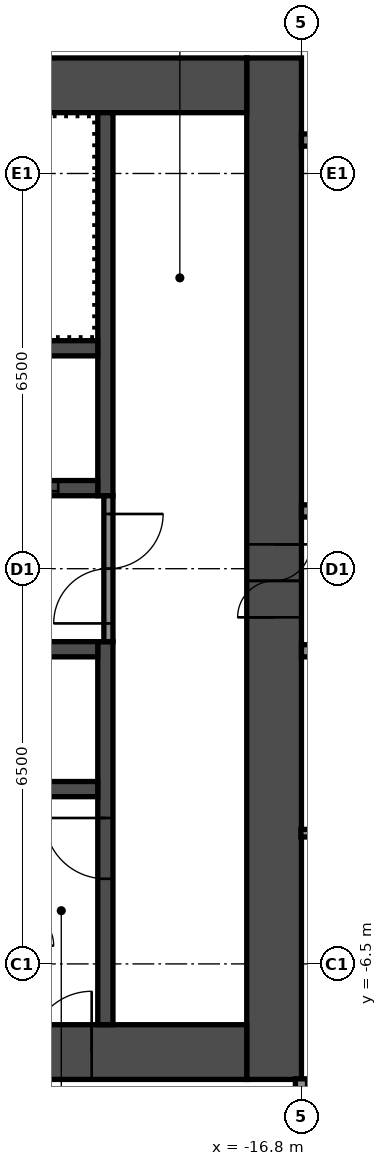
"""IFC4 building model, lengths in metres.
Left out: names, types, materials, properties, quantities, classifications, styles, units other than length and angle.
Written with IfcOpenShell. Run it as: python <this file> out.ifc"""

import sys

from ifc_helpers import new_model, si_unit, direction, frame, frame_2d, origin, place, context, subcontext, project, spatial, rectangle, extrude, element, fill, save


model = new_model("IFC4")
c1 = context("Model", 3, precision=1e-05, world=origin(), true_north=direction((0.0, 1.0)))
c2 = subcontext(c1, "Body", "Model", "MODEL_VIEW")
j1 = project(units=[si_unit("LENGTHUNIT", "METRE"), si_unit("PLANEANGLEUNIT", "RADIAN")], contexts=[c1])
p1 = place(None, origin())
s1 = spatial("IfcSite", under=j1, at=p1, CompositionType="ELEMENT")
p2 = place(p1, origin())
s2 = spatial("IfcBuilding", under=s1, at=p2, CompositionType="ELEMENT")
p3 = place(p2, frame((0.0, 0.0, 94.6)))
s3 = spatial("IfcBuildingStorey", under=s2, at=p3, CompositionType="ELEMENT", Elevation=94.6)
p4 = place(p3, frame((-17.25, -8.4, 0.0), z_axis=(0.0, 0.0, 1.0), x_axis=(0.0, 1.0, 0.0)))
e1 = element("IfcWall", 1, at=p4, inside=s3, PredefinedType="SHEAR", context=c2, shape_type="SweptSolid", body=[
    extrude(rectangle(XDim=16.8, YDim=0.9, at=frame_2d((8.4, 0.0))), origin(), (0.0, 0.0, 1.0), 2.8),
])
p5 = place(p4, frame((7.6, 0.0, 0.0)))
e2 = element("IfcOpeningElement", 2, at=p5, cuts=e1, PredefinedType="OPENING", context=c2, shape_type="SweptSolid", body=[
    extrude(rectangle(XDim=1.2, YDim=2.1, at=frame_2d((0.6, 1.05))), frame((0.0, 0.46, 0.0), z_axis=(0.0, -1.0, 0.0), x_axis=(1.0, 0.0, 0.0)), (0.0, 0.0, 1.0), 0.92),
])
p6 = place(p3, frame((-32.7, 7.95, 0.0), z_axis=(0.0, 0.0, 1.0), x_axis=(1.0, 0.0, 0.0)))
e3 = element("IfcWall", 3, at=p6, inside=s3, PredefinedType="SHEAR", context=c2, shape_type="SweptSolid", body=[
    extrude(rectangle(XDim=15.0, YDim=0.9, at=frame_2d((7.5, 0.0))), origin(), (0.0, 0.0, 1.0), 2.8),
])
p7 = place(p6, frame((3.4, 0.0, 0.0)))
e4 = element("IfcOpeningElement", 4, at=p7, cuts=e3, PredefinedType="OPENING", context=c2, shape_type="SweptSolid", body=[
    extrude(rectangle(XDim=1.2, YDim=2.1, at=frame_2d((0.6, 1.05))), frame((0.0, 0.46, 0.0), z_axis=(0.0, -1.0, 0.0), x_axis=(1.0, 0.0, 0.0)), (0.0, 0.0, 1.0), 0.92),
])
p8 = place(p6, frame((0.75, 0.0, 0.0)))
e5 = element("IfcOpeningElement", 5, at=p8, cuts=e3, PredefinedType="OPENING", context=c2, shape_type="SweptSolid", body=[
    extrude(rectangle(XDim=0.9, YDim=2.1, at=frame_2d((0.45, 1.05))), frame((0.0, 0.46, 0.0), z_axis=(0.0, -1.0, 0.0), x_axis=(1.0, 0.0, 0.0)), (0.0, 0.0, 1.0), 0.92),
])
p9 = place(p3, frame((-32.7, -7.95, 0.0), z_axis=(0.0, 0.0, 1.0), x_axis=(1.0, 0.0, 0.0)))
e6 = element("IfcWall", 6, at=p9, inside=s3, PredefinedType="SHEAR", context=c2, shape_type="SweptSolid", body=[
    extrude(rectangle(XDim=15.0, YDim=0.9, at=frame_2d((7.5, 0.0))), origin(), (0.0, 0.0, 1.0), 2.8),
])
p10 = place(p9, frame((11.45, 0.0, 0.0)))
e7 = element("IfcOpeningElement", 7, at=p10, cuts=e6, PredefinedType="OPENING", context=c2, shape_type="SweptSolid", body=[
    extrude(rectangle(XDim=1.0, YDim=2.1, at=frame_2d((0.5, 1.05))), frame((0.0, 0.46, 0.0), z_axis=(0.0, -1.0, 0.0), x_axis=(1.0, 0.0, 0.0)), (0.0, 0.0, 1.0), 0.92),
])
p11 = place(p3, frame((-20.025, 1.2, 0.0), z_axis=(0.0, 0.0, 1.0), x_axis=(0.0, 1.0, 0.0)))
e8 = element("IfcWall", 8, at=p11, inside=s3, PredefinedType="SHEAR", context=c2, shape_type="SweptSolid", body=[
    extrude(rectangle(XDim=6.3, YDim=0.25, at=frame_2d((3.15, 0.0))), origin(), (0.0, 0.0, 1.0), 2.8),
])
p12 = place(p3, frame((-20.025, -7.5, 0.0), z_axis=(0.0, 0.0, 1.0), x_axis=(0.0, 1.0, 0.0)))
e9 = element("IfcWall", 9, at=p12, inside=s3, PredefinedType="SHEAR", context=c2, shape_type="SweptSolid", body=[
    extrude(rectangle(XDim=6.3, YDim=0.25, at=frame_2d((3.15, 0.0))), origin(), (0.0, 0.0, 1.0), 2.8),
])
p13 = place(p12, frame((2.4, 0.0, 0.0)))
e10 = element("IfcOpeningElement", 10, at=p13, cuts=e9, PredefinedType="OPENING", context=c2, shape_type="SweptSolid", body=[
    extrude(rectangle(XDim=1.0, YDim=2.1, at=frame_2d((0.5, 1.05))), frame((0.0, 0.135, 0.0), z_axis=(0.0, -1.0, 0.0), x_axis=(1.0, 0.0, 0.0)), (0.0, 0.0, 1.0), 0.27),
])
p14 = place(p3, frame((-27.65, 1.325, 0.0), z_axis=(0.0, 0.0, 1.0), x_axis=(1.0, 0.0, 0.0)))
e11 = element("IfcWall", 11, at=p14, inside=s3, PredefinedType="SHEAR", context=c2, shape_type="SweptSolid", body=[
    extrude(rectangle(XDim=7.5, YDim=0.25, at=frame_2d((3.75, 0.0))), origin(), (0.0, 0.0, 1.0), 2.8),
])
p15 = place(p14, frame((5.75, 0.0, 0.0)))
e12 = element("IfcOpeningElement", 12, at=p15, cuts=e11, PredefinedType="OPENING", context=c2, shape_type="SweptSolid", body=[
    extrude(rectangle(XDim=1.1, YDim=2.1, at=frame_2d((0.55, 1.05))), frame((0.0, 0.135, 0.0), z_axis=(0.0, -1.0, 0.0), x_axis=(1.0, 0.0, 0.0)), (0.0, 0.0, 1.0), 0.27),
])
p16 = place(p14, frame((3.35, 0.0, 0.0)))
e13 = element("IfcOpeningElement", 13, at=p16, cuts=e11, PredefinedType="OPENING", context=c2, shape_type="SweptSolid", body=[
    extrude(rectangle(XDim=1.1, YDim=2.1, at=frame_2d((0.55, 1.05))), frame((0.0, 0.135, 0.0), z_axis=(0.0, -1.0, 0.0), x_axis=(1.0, 0.0, 0.0)), (0.0, 0.0, 1.0), 0.27),
])
p17 = place(p14, frame((0.95, 0.0, 0.0)))
e14 = element("IfcOpeningElement", 14, at=p17, cuts=e11, PredefinedType="OPENING", context=c2, shape_type="SweptSolid", body=[
    extrude(rectangle(XDim=1.1, YDim=2.1, at=frame_2d((0.55, 1.05))), frame((0.0, 0.135, 0.0), z_axis=(0.0, -1.0, 0.0), x_axis=(1.0, 0.0, 0.0)), (0.0, 0.0, 1.0), 0.27),
])
for number, where, z_axis, x_axis in (
    (15, (-27.65, 3.625, 0.0), (0.0, 0.0, 1.0), (1.0, 0.0, 0.0)),
    (16, (-27.65, -1.325, 0.0), (0.0, 0.0, 1.0), (1.0, 0.0, 0.0)),
    (17, (-27.65, -3.625, 0.0), (0.0, 0.0, 1.0), (1.0, 0.0, 0.0)),
):
    element("IfcWall", number, at=place(p3, frame(where, z_axis=z_axis, x_axis=x_axis)), inside=s3, PredefinedType="SHEAR", context=c2, shape_type="SweptSolid", body=[
        extrude(rectangle(XDim=7.5, YDim=0.25, at=frame_2d((3.75, 0.0))), origin(), (0.0, 0.0, 1.0), 2.8),
    ])
p18 = place(p3, frame((-19.975, -1.2, 0.0), z_axis=(0.0, 0.0, 1.0), x_axis=(0.0, 1.0, 0.0)))
e18 = element("IfcWall", 18, at=p18, inside=s3, PredefinedType="PARTITIONING", context=c2, shape_type="SweptSolid", body=[
    extrude(rectangle(XDim=2.4, YDim=0.15, at=frame_2d((1.2, 0.0))), origin(), (0.0, 0.0, 1.0), 2.8),
])
p19 = place(p18, frame((0.3, 0.0, 0.0)))
e19 = element("IfcOpeningElement", 19, at=p19, cuts=e18, PredefinedType="OPENING", context=c2, shape_type="SweptSolid", body=[
    extrude(rectangle(XDim=1.8, YDim=2.1, at=frame_2d((0.9, 1.05))), frame((0.0, 0.085, 0.0), z_axis=(0.0, -1.0, 0.0), x_axis=(1.0, 0.0, 0.0)), (0.0, 0.0, 1.0), 0.17),
])
p20 = place(p3, frame((-16.81, -4.35, 0.0), z_axis=(0.0, 0.0, 1.0), x_axis=(1.0, 0.0, 0.0)))
e20 = element("IfcWall", 20, at=p20, inside=s3, PredefinedType="PARTITIONING", context=c2, shape_type="SweptSolid", body=[
    extrude(rectangle(XDim=2.448, YDim=0.125, at=frame_2d((1.224, 0.0))), origin(), (0.0, 0.0, 1.0), 2.8),
])
p21 = place(p3, frame((-16.8, -1.35, 0.0), z_axis=(0.0, 0.0, 1.0), x_axis=(1.0, 0.0, 0.0)))
e21 = element("IfcWall", 21, at=p21, inside=s3, PredefinedType="PARTITIONING", context=c2, shape_type="SweptSolid", body=[
    extrude(rectangle(XDim=33.6, YDim=0.2, at=frame_2d((16.8, 0.0))), origin(), (0.0, 0.0, 1.0), 2.8),
])
p22 = place(p21, frame((2.85, 0.0, 0.0)))
e22 = element("IfcOpeningElement", 22, at=p22, cuts=e21, PredefinedType="OPENING", context=c2, shape_type="SweptSolid", body=[
    extrude(rectangle(XDim=1.0, YDim=2.1, at=frame_2d((0.5, 1.05))), frame((0.0, 0.11, 0.0), z_axis=(0.0, -1.0, 0.0), x_axis=(1.0, 0.0, 0.0)), (0.0, 0.0, 1.0), 0.22),
])
p23 = place(p21, frame((4.55, 0.0, 0.0)))
e23 = element("IfcOpeningElement", 23, at=p23, cuts=e21, PredefinedType="OPENING", context=c2, shape_type="SweptSolid", body=[
    extrude(rectangle(XDim=1.0, YDim=2.1, at=frame_2d((0.5, 1.05))), frame((0.0, 0.11, 0.0), z_axis=(0.0, -1.0, 0.0), x_axis=(1.0, 0.0, 0.0)), (0.0, 0.0, 1.0), 0.22),
])
p24 = place(p21, frame((11.25, 0.0, 0.0)))
e24 = element("IfcOpeningElement", 24, at=p24, cuts=e21, PredefinedType="OPENING", context=c2, shape_type="SweptSolid", body=[
    extrude(rectangle(XDim=1.0, YDim=2.1, at=frame_2d((0.5, 1.05))), frame((0.0, 0.11, 0.0), z_axis=(0.0, -1.0, 0.0), x_axis=(1.0, 0.0, 0.0)), (0.0, 0.0, 1.0), 0.22),
])
p25 = place(p21, frame((12.95, 0.0, 0.0)))
e25 = element("IfcOpeningElement", 25, at=p25, cuts=e21, PredefinedType="OPENING", context=c2, shape_type="SweptSolid", body=[
    extrude(rectangle(XDim=1.0, YDim=2.1, at=frame_2d((0.5, 1.05))), frame((0.0, 0.11, 0.0), z_axis=(0.0, -1.0, 0.0), x_axis=(1.0, 0.0, 0.0)), (0.0, 0.0, 1.0), 0.22),
])
p26 = place(p21, frame((18.785, 0.0, 0.0)))
e26 = element("IfcOpeningElement", 26, at=p26, cuts=e21, PredefinedType="OPENING", context=c2, shape_type="SweptSolid", body=[
    extrude(rectangle(XDim=0.9, YDim=2.1, at=frame_2d((0.45, 1.05))), frame((0.0, 0.11, 0.0), z_axis=(0.0, -1.0, 0.0), x_axis=(1.0, 0.0, 0.0)), (0.0, 0.0, 1.0), 0.22),
])
p27 = place(p21, frame((22.985, 0.0, 0.0)))
e27 = element("IfcOpeningElement", 27, at=p27, cuts=e21, PredefinedType="OPENING", context=c2, shape_type="SweptSolid", body=[
    extrude(rectangle(XDim=0.9, YDim=2.1, at=frame_2d((0.45, 1.05))), frame((0.0, 0.11, 0.0), z_axis=(0.0, -1.0, 0.0), x_axis=(1.0, 0.0, 0.0)), (0.0, 0.0, 1.0), 0.22),
])
p28 = place(p21, frame((28.05, 0.0, 0.0)))
e28 = element("IfcOpeningElement", 28, at=p28, cuts=e21, PredefinedType="OPENING", context=c2, shape_type="SweptSolid", body=[
    extrude(rectangle(XDim=1.0, YDim=2.1, at=frame_2d((0.5, 1.05))), frame((0.0, 0.11, 0.0), z_axis=(0.0, -1.0, 0.0), x_axis=(1.0, 0.0, 0.0)), (0.0, 0.0, 1.0), 0.22),
])
p29 = place(p21, frame((29.75, 0.0, 0.0)))
e29 = element("IfcOpeningElement", 29, at=p29, cuts=e21, PredefinedType="OPENING", context=c2, shape_type="SweptSolid", body=[
    extrude(rectangle(XDim=1.0, YDim=2.1, at=frame_2d((0.5, 1.05))), frame((0.0, 0.11, 0.0), z_axis=(0.0, -1.0, 0.0), x_axis=(1.0, 0.0, 0.0)), (0.0, 0.0, 1.0), 0.22),
])
p30 = place(p3, frame((-16.8, 0.95, 0.0), z_axis=(0.0, 0.0, 1.0), x_axis=(1.0, 0.0, 0.0)))
e30 = element("IfcWall", 30, at=p30, inside=s3, PredefinedType="PARTITIONING", context=c2, shape_type="SweptSolid", body=[
    extrude(rectangle(XDim=33.6, YDim=0.2, at=frame_2d((16.8, 0.0))), origin(), (0.0, 0.0, 1.0), 2.8),
])
p31 = place(p30, frame((9.88, 0.0, 0.0)))
e31 = element("IfcOpeningElement", 31, at=p31, cuts=e30, PredefinedType="OPENING", context=c2, shape_type="SweptSolid", body=[
    extrude(rectangle(XDim=0.9, YDim=2.1, at=frame_2d((0.45, 1.05))), frame((0.0, 0.11, 0.0), z_axis=(0.0, -1.0, 0.0), x_axis=(1.0, 0.0, 0.0)), (0.0, 0.0, 1.0), 0.22),
])
p32 = place(p30, frame((14.08, 0.0, 0.0)))
e32 = element("IfcOpeningElement", 32, at=p32, cuts=e30, PredefinedType="OPENING", context=c2, shape_type="SweptSolid", body=[
    extrude(rectangle(XDim=0.9, YDim=2.1, at=frame_2d((0.45, 1.05))), frame((0.0, 0.11, 0.0), z_axis=(0.0, -1.0, 0.0), x_axis=(1.0, 0.0, 0.0)), (0.0, 0.0, 1.0), 0.22),
])
p33 = place(p30, frame((26.345, 0.0, 0.0)))
e33 = element("IfcOpeningElement", 33, at=p33, cuts=e30, PredefinedType="OPENING", context=c2, shape_type="SweptSolid", body=[
    extrude(rectangle(XDim=0.9, YDim=2.1, at=frame_2d((0.45, 1.05))), frame((0.0, 0.11, 0.0), z_axis=(0.0, -1.0, 0.0), x_axis=(1.0, 0.0, 0.0)), (0.0, 0.0, 1.0), 0.22),
])
p34 = place(p30, frame((30.545, 0.0, 0.0)))
e34 = element("IfcOpeningElement", 34, at=p34, cuts=e30, PredefinedType="OPENING", context=c2, shape_type="SweptSolid", body=[
    extrude(rectangle(XDim=0.9, YDim=2.1, at=frame_2d((0.45, 1.05))), frame((0.0, 0.11, 0.0), z_axis=(0.0, -1.0, 0.0), x_axis=(1.0, 0.0, 0.0)), (0.0, 0.0, 1.0), 0.22),
])
p35 = place(p3, frame((-16.8, 7.05, 0.0), z_axis=(0.0, 0.0, 1.0), x_axis=(1.0, 0.0, 0.0)))
e35 = element("IfcWall", 35, at=p35, inside=s3, PredefinedType="PARTITIONING", context=c2, shape_type="SweptSolid", body=[
    extrude(rectangle(XDim=33.6, YDim=0.2, at=frame_2d((16.8, 0.0))), origin(), (0.0, 0.0, 1.0), 2.8),
])
p36 = place(p35, frame((1.9, 0.0, 0.0)))
e36 = element("IfcOpeningElement", 36, at=p36, cuts=e35, PredefinedType="OPENING", context=c2, shape_type="SweptSolid", body=[
    extrude(rectangle(XDim=0.9, YDim=2.1, at=frame_2d((0.45, 1.05))), frame((0.0, 0.11, 0.0), z_axis=(0.0, -1.0, 0.0), x_axis=(1.0, 0.0, 0.0)), (0.0, 0.0, 1.0), 0.22),
])
p37 = place(p35, frame((6.1, 0.0, 0.0)))
e37 = element("IfcOpeningElement", 37, at=p37, cuts=e35, PredefinedType="OPENING", context=c2, shape_type="SweptSolid", body=[
    extrude(rectangle(XDim=0.9, YDim=2.1, at=frame_2d((0.45, 1.05))), frame((0.0, 0.11, 0.0), z_axis=(0.0, -1.0, 0.0), x_axis=(1.0, 0.0, 0.0)), (0.0, 0.0, 1.0), 0.22),
])
p38 = place(p35, frame((17.86, 0.0, 0.0)))
e38 = element("IfcOpeningElement", 38, at=p38, cuts=e35, PredefinedType="OPENING", context=c2, shape_type="SweptSolid", body=[
    extrude(rectangle(XDim=0.9, YDim=2.1, at=frame_2d((0.45, 1.05))), frame((0.0, 0.11, 0.0), z_axis=(0.0, -1.0, 0.0), x_axis=(1.0, 0.0, 0.0)), (0.0, 0.0, 1.0), 0.22),
])
p39 = place(p35, frame((22.06, 0.0, 0.0)))
e39 = element("IfcOpeningElement", 39, at=p39, cuts=e35, PredefinedType="OPENING", context=c2, shape_type="SweptSolid", body=[
    extrude(rectangle(XDim=0.9, YDim=2.1, at=frame_2d((0.45, 1.05))), frame((0.0, 0.11, 0.0), z_axis=(0.0, -1.0, 0.0), x_axis=(1.0, 0.0, 0.0)), (0.0, 0.0, 1.0), 0.22),
])
p40 = place(p3, frame((-16.8, -15.55, 0.0), z_axis=(0.0, 0.0, 1.0), x_axis=(0.0, 1.0, 0.0)))
e40 = element("IfcWall", 40, at=p40, inside=s3, PredefinedType="PARTITIONING", context=c2, shape_type="SweptSolid", body=[
    extrude(rectangle(XDim=7.16, YDim=0.2, at=frame_2d((3.58, 0.0))), origin(), (0.0, 0.0, 1.0), 2.8),
])
p41 = place(p5, origin())
e41 = element("IfcDoor", 41, at=p41, inside=s3, OperationType="DOUBLE_DOOR_SINGLE_SWING", PredefinedType="DOOR", context=c2, shape_type="SweptSolid", body=[
    extrude(rectangle(XDim=1.2, YDim=2.1, at=frame_2d((0.6, 1.05))), frame((0.0, 0.025, 0.0), z_axis=(0.0, -1.0, 0.0), x_axis=(1.0, 0.0, 0.0)), (0.0, 0.0, 1.0), 0.05),
])
fill(e2, e41)
p42 = place(p10, origin())
e42 = element("IfcDoor", 42, at=p42, inside=s3, OperationType="SINGLE_SWING_LEFT", PredefinedType="DOOR", context=c2, shape_type="SweptSolid", body=[
    extrude(rectangle(XDim=1.0, YDim=2.1, at=frame_2d((0.5, 1.05))), frame((0.0, 0.025, 0.0), z_axis=(0.0, -1.0, 0.0), x_axis=(1.0, 0.0, 0.0)), (0.0, 0.0, 1.0), 0.05),
])
fill(e7, e42)
p43 = place(p13, origin())
e43 = element("IfcDoor", 43, at=p43, inside=s3, OperationType="SINGLE_SWING_LEFT", PredefinedType="DOOR", context=c2, shape_type="SweptSolid", body=[
    extrude(rectangle(XDim=1.0, YDim=2.1, at=frame_2d((0.5, 1.05))), frame((0.0, 0.025, 0.0), z_axis=(0.0, -1.0, 0.0), x_axis=(1.0, 0.0, 0.0)), (0.0, 0.0, 1.0), 0.05),
])
fill(e10, e43)
p44 = place(p19, origin())
e44 = element("IfcDoor", 44, at=p44, inside=s3, OperationType="DOUBLE_DOOR_SINGLE_SWING", PredefinedType="DOOR", context=c2, shape_type="SweptSolid", body=[
    extrude(rectangle(XDim=1.8, YDim=2.1, at=frame_2d((0.9, 1.05))), frame((0.0, 0.025, 0.0), z_axis=(0.0, -1.0, 0.0), x_axis=(1.0, 0.0, 0.0)), (0.0, 0.0, 1.0), 0.05),
])
fill(e19, e44)
p45 = place(p15, origin())
e45 = element("IfcDoor", 45, at=p45, inside=s3, OperationType="DOUBLE_DOOR_SLIDING", PredefinedType="DOOR", context=c2, shape_type="SweptSolid", body=[
    extrude(rectangle(XDim=1.1, YDim=2.1, at=frame_2d((0.55, 1.05))), frame((0.0, 0.025, 0.0), z_axis=(0.0, -1.0, 0.0), x_axis=(1.0, 0.0, 0.0)), (0.0, 0.0, 1.0), 0.05),
])
fill(e12, e45)
save(model, sys.argv[1])
